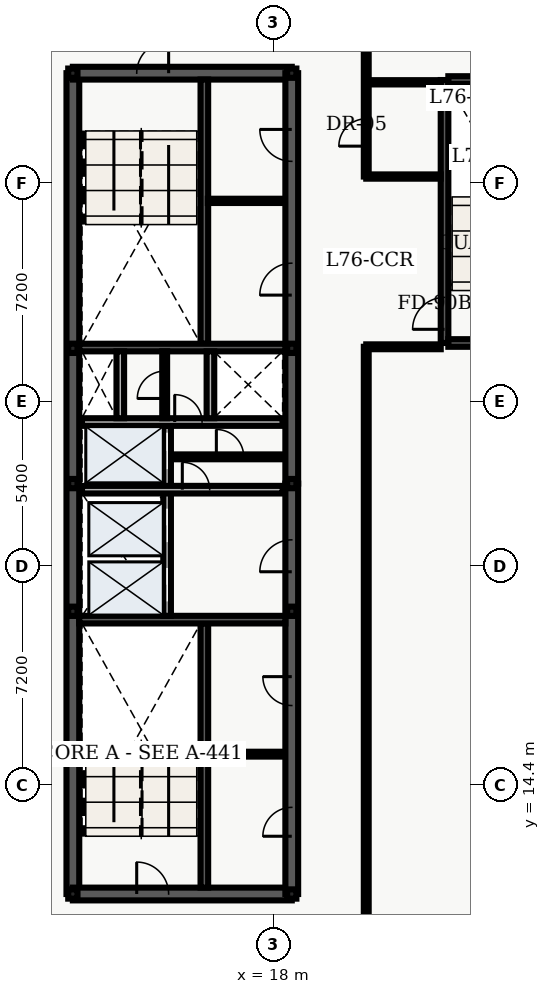
"""IFC4 building model, lengths in metres.
Left out: names, types, materials, properties, quantities, classifications, styles, units other than length and angle.
Written with IfcOpenShell. Run it as: python <this file> out.ifc"""

import sys

from ifc_helpers import new_model, entity, si_unit, converted_unit, direction, frame, origin_with_axes, origin_2d_with_axis, place, context, subcontext, project, spatial, polyline, rectangle, hollow_rectangle, outline, extrude, element, fill, save


model = new_model("IFC4")
c1 = context("Model", 3, precision=1e-05, world=origin_with_axes(), true_north=direction((0.0, 1.0)))
c2 = subcontext(c1, "Body", "Model", "MODEL_VIEW")
j1 = project(units=[si_unit("LENGTHUNIT", "METRE"), converted_unit("PLANEANGLEUNIT", "DEGREE", entity("IfcPlaneAngleMeasure", 0.017), si_unit("PLANEANGLEUNIT", "RADIAN"), dimensions=[0, 0, 0, 0, 0, 0, 0])], contexts=[c1])
p1 = place(None, origin_with_axes())
s1 = spatial("IfcSite", under=j1, at=p1, CompositionType="ELEMENT")
p2 = place(p1, origin_with_axes())
s2 = spatial("IfcBuilding", under=s1, at=p2, CompositionType="ELEMENT")
p3 = place(p2, frame((0.0, 0.0, 308.7), z_axis=(0.0, 0.0, 1.0), x_axis=(1.0, 0.0, 0.0)))
s3 = spatial("IfcBuildingStorey", under=s2, at=p3, CompositionType="ELEMENT", Elevation=308.7)
p4 = place(p3, frame((11.4, 10.8, 0.0), z_axis=(0.0, 0.0, 1.0), x_axis=(0.0, 1.0, 0.0)))
e1 = element("IfcWall", 1, at=p4, inside=s3, PredefinedType="SHEAR", context=c2, shape_type="SweptSolid", body=[
    extrude(outline(polyline([(0.0, -0.21), (27.0, -0.21), (27.0, 0.21), (0.0, 0.21), (0.0, -0.21)])), origin_with_axes(), (0.0, 0.0, 1.0), 3.64),
])
p5 = place(p3, frame((11.4, 10.8, 0.0), z_axis=(0.0, 0.0, 1.0), x_axis=(1.0, 0.0, 0.0)))
e2 = element("IfcWall", 2, at=p5, inside=s3, PredefinedType="SHEAR", context=c2, shape_type="SweptSolid", body=[
    extrude(outline(polyline([(0.0, -0.21), (7.2, -0.21), (7.2, 0.21), (0.0, 0.21), (0.0, -0.21)])), origin_with_axes(), (0.0, 0.0, 1.0), 3.64),
])
p6 = place(p5, frame((2.625, 0.0, 0.0), z_axis=(0.0, 0.0, 1.0), x_axis=(1.0, 0.0, 0.0)))
e3 = element("IfcOpeningElement", 3, at=p6, cuts=e2, PredefinedType="OPENING", context=c2, shape_type="SweptSolid", body=[
    extrude(rectangle(XDim=1.05, YDim=0.44, at=origin_2d_with_axis()), origin_with_axes(), (0.0, 0.0, 1.0), 2.15),
])
p7 = place(p3, frame((11.4, 37.8, 0.0), z_axis=(0.0, 0.0, 1.0), x_axis=(1.0, 0.0, 0.0)))
e4 = element("IfcWall", 4, at=p7, inside=s3, PredefinedType="SHEAR", context=c2, shape_type="SweptSolid", body=[
    extrude(outline(polyline([(0.0, -0.21), (7.2, -0.21), (7.2, 0.21), (0.0, 0.21), (0.0, -0.21)])), origin_with_axes(), (0.0, 0.0, 1.0), 3.64),
])
p8 = place(p7, frame((2.625, 0.0, 0.0), z_axis=(0.0, 0.0, 1.0), x_axis=(1.0, 0.0, 0.0)))
e5 = element("IfcOpeningElement", 5, at=p8, cuts=e4, PredefinedType="OPENING", context=c2, shape_type="SweptSolid", body=[
    extrude(rectangle(XDim=1.05, YDim=0.44, at=origin_2d_with_axis()), origin_with_axes(), (0.0, 0.0, 1.0), 2.15),
])
p9 = place(p3, frame((18.6, 10.8, 0.0), z_axis=(0.0, 0.0, 1.0), x_axis=(0.0, 1.0, 0.0)))
e6 = element("IfcWall", 6, at=p9, inside=s3, PredefinedType="SHEAR", context=c2, shape_type="SweptSolid", body=[
    extrude(outline(polyline([(0.0, -0.21), (13.5, -0.21), (13.5, 0.21), (0.0, 0.21), (0.0, -0.21)])), origin_with_axes(), (0.0, 0.0, 1.0), 3.64),
])
p10 = place(p9, frame((11.125, 0.0, 0.0), z_axis=(0.0, 0.0, 1.0), x_axis=(1.0, 0.0, 0.0)))
e7 = element("IfcOpeningElement", 7, at=p10, cuts=e6, PredefinedType="OPENING", context=c2, shape_type="SweptSolid", body=[
    extrude(rectangle(XDim=1.05, YDim=0.44, at=origin_2d_with_axis()), origin_with_axes(), (0.0, 0.0, 1.0), 2.15),
])
p11 = place(p9, frame((2.375, 0.0, 0.0), z_axis=(0.0, 0.0, 1.0), x_axis=(1.0, 0.0, 0.0)))
e8 = element("IfcOpeningElement", 8, at=p11, cuts=e6, PredefinedType="OPENING", context=c2, shape_type="SweptSolid", body=[
    extrude(rectangle(XDim=0.95, YDim=0.44, at=origin_2d_with_axis()), origin_with_axes(), (0.0, 0.0, 1.0), 2.15),
])
p12 = place(p9, frame((6.675, 0.0, 0.0), z_axis=(0.0, 0.0, 1.0), x_axis=(1.0, 0.0, 0.0)))
e9 = element("IfcOpeningElement", 9, at=p12, cuts=e6, PredefinedType="OPENING", context=c2, shape_type="SweptSolid", body=[
    extrude(rectangle(XDim=0.95, YDim=0.44, at=origin_2d_with_axis()), origin_with_axes(), (0.0, 0.0, 1.0), 2.15),
])
p13 = place(p3, frame((18.6, 24.3, 0.0), z_axis=(0.0, 0.0, 1.0), x_axis=(0.0, 1.0, 0.0)))
e10 = element("IfcWall", 10, at=p13, inside=s3, PredefinedType="SHEAR", context=c2, shape_type="SweptSolid", body=[
    extrude(outline(polyline([(0.0, -0.21), (13.5, -0.21), (13.5, 0.21), (0.0, 0.21), (0.0, -0.21)])), origin_with_axes(), (0.0, 0.0, 1.0), 3.64),
])
p14 = place(p13, frame((6.725, 0.0, 0.0), z_axis=(0.0, 0.0, 1.0), x_axis=(1.0, 0.0, 0.0)))
e11 = element("IfcOpeningElement", 11, at=p14, cuts=e10, PredefinedType="OPENING", context=c2, shape_type="SweptSolid", body=[
    extrude(rectangle(XDim=1.05, YDim=0.44, at=origin_2d_with_axis()), origin_with_axes(), (0.0, 0.0, 1.0), 2.15),
])
p15 = place(p13, frame((11.125, 0.0, 0.0), z_axis=(0.0, 0.0, 1.0), x_axis=(1.0, 0.0, 0.0)))
e12 = element("IfcOpeningElement", 12, at=p15, cuts=e10, PredefinedType="OPENING", context=c2, shape_type="SweptSolid", body=[
    extrude(rectangle(XDim=1.05, YDim=0.44, at=origin_2d_with_axis()), origin_with_axes(), (0.0, 0.0, 1.0), 2.15),
])
p16 = place(p3, frame((15.725, 11.01, 0.0), z_axis=(0.0, 0.0, 1.0), x_axis=(0.0, 1.0, 0.0)))
e13 = element("IfcWall", 13, at=p16, inside=s3, PredefinedType="SHEAR", context=c2, shape_type="SweptSolid", body=[
    extrude(outline(polyline([(0.0, -0.125), (8.69, -0.125), (8.69, 0.125), (0.0, 0.125), (0.0, -0.125)])), origin_with_axes(), (0.0, 0.0, 1.0), 3.64),
])
p17 = place(p3, frame((11.61, 19.825, 0.0), z_axis=(0.0, 0.0, 1.0), x_axis=(1.0, 0.0, 0.0)))
e14 = element("IfcWall", 14, at=p17, inside=s3, PredefinedType="SHEAR", context=c2, shape_type="SweptSolid", body=[
    extrude(outline(polyline([(0.0, -0.125), (6.78, -0.125), (6.78, 0.125), (0.0, 0.125), (0.0, -0.125)])), origin_with_axes(), (0.0, 0.0, 1.0), 3.64),
])
p18 = place(p3, frame((15.725, 28.9, 0.0), z_axis=(0.0, 0.0, 1.0), x_axis=(0.0, 1.0, 0.0)))
e15 = element("IfcWall", 15, at=p18, inside=s3, PredefinedType="SHEAR", context=c2, shape_type="SweptSolid", body=[
    extrude(outline(polyline([(0.0, -0.125), (8.69, -0.125), (8.69, 0.125), (0.0, 0.125), (0.0, -0.125)])), origin_with_axes(), (0.0, 0.0, 1.0), 3.64),
])
p19 = place(p3, frame((11.61, 28.775, 0.0), z_axis=(0.0, 0.0, 1.0), x_axis=(1.0, 0.0, 0.0)))
e16 = element("IfcWall", 16, at=p19, inside=s3, PredefinedType="SHEAR", context=c2, shape_type="SweptSolid", body=[
    extrude(outline(polyline([(0.0, -0.125), (6.78, -0.125), (6.78, 0.125), (0.0, 0.125), (0.0, -0.125)])), origin_with_axes(), (0.0, 0.0, 1.0), 3.64),
])
p20 = place(p3, frame((14.5, 19.95, 0.0), z_axis=(0.0, 0.0, 1.0), x_axis=(0.0, 1.0, 0.0)))
e17 = element("IfcWall", 17, at=p20, inside=s3, PredefinedType="SOLIDWALL", context=c2, shape_type="SweptSolid", body=[
    extrude(outline(polyline([(0.0, -0.125), (6.25, -0.125), (6.25, 0.125), (0.0, 0.125), (0.0, -0.125)])), origin_with_axes(), (0.0, 0.0, 1.0), 2.68),
])
p21 = place(p20, frame((1.025, 0.0, 0.0), z_axis=(0.0, 0.0, 1.0), x_axis=(1.0, 0.0, 0.0)))
e18 = element("IfcOpeningElement", 18, at=p21, cuts=e17, PredefinedType="OPENING", context=c2, shape_type="SweptSolid", body=[
    extrude(rectangle(XDim=1.1, YDim=0.27, at=origin_2d_with_axis()), origin_with_axes(), (0.0, 0.0, 1.0), 2.15),
])
p22 = place(p20, frame((2.975, 0.0, 0.0), z_axis=(0.0, 0.0, 1.0), x_axis=(1.0, 0.0, 0.0)))
e19 = element("IfcOpeningElement", 19, at=p22, cuts=e17, PredefinedType="OPENING", context=c2, shape_type="SweptSolid", body=[
    extrude(rectangle(XDim=1.1, YDim=0.27, at=origin_2d_with_axis()), origin_with_axes(), (0.0, 0.0, 1.0), 2.15),
])
p23 = place(p20, frame((5.425, 0.0, 0.0), z_axis=(0.0, 0.0, 1.0), x_axis=(1.0, 0.0, 0.0)))
e20 = element("IfcOpeningElement", 20, at=p23, cuts=e17, PredefinedType="OPENING", context=c2, shape_type="SweptSolid", body=[
    extrude(rectangle(XDim=1.2, YDim=0.27, at=origin_2d_with_axis()), origin_with_axes(), (0.0, 0.0, 1.0), 2.15),
])
p24 = place(p3, frame((11.7, 24.1, 0.0), z_axis=(0.0, 0.0, 1.0), x_axis=(1.0, 0.0, 0.0)))
e21 = element("IfcWall", 21, at=p24, inside=s3, PredefinedType="SOLIDWALL", context=c2, shape_type="SweptSolid", body=[
    extrude(outline(polyline([(0.0, -0.125), (6.6, -0.125), (6.6, 0.125), (0.0, 0.125), (0.0, -0.125)])), origin_with_axes(), (0.0, 0.0, 1.0), 2.68),
])
p25 = place(p24, frame((3.75, 0.0, 0.0), z_axis=(0.0, 0.0, 1.0), x_axis=(1.0, 0.0, 0.0)))
e22 = element("IfcOpeningElement", 22, at=p25, cuts=e21, PredefinedType="OPENING", context=c2, shape_type="SweptSolid", body=[
    extrude(rectangle(XDim=0.9, YDim=0.27, at=origin_2d_with_axis()), origin_with_axes(), (0.0, 0.0, 1.0), 2.15),
])
p26 = place(p3, frame((11.7, 26.325, 0.0), z_axis=(0.0, 0.0, 1.0), x_axis=(1.0, 0.0, 0.0)))
e23 = element("IfcWall", 23, at=p26, inside=s3, PredefinedType="SOLIDWALL", context=c2, shape_type="SweptSolid", body=[
    extrude(outline(polyline([(0.0, -0.125), (6.6, -0.125), (6.6, 0.125), (0.0, 0.125), (0.0, -0.125)])), origin_with_axes(), (0.0, 0.0, 1.0), 2.68),
])
p27 = place(p26, frame((3.5, 0.0, 0.0), z_axis=(0.0, 0.0, 1.0), x_axis=(1.0, 0.0, 0.0)))
e24 = element("IfcOpeningElement", 24, at=p27, cuts=e23, PredefinedType="OPENING", context=c2, shape_type="SweptSolid", body=[
    extrude(rectangle(XDim=0.9, YDim=0.27, at=origin_2d_with_axis()), origin_with_axes(), (0.0, 0.0, 1.0), 2.15),
])
for number, where, z_axis, x_axis in (
    (25, (12.96, 26.45, 0.0), (0.0, 0.0, 1.0), (0.0, 1.0, 0.0)),
    (26, (15.925, 26.45, 0.0), (0.0, 0.0, 1.0), (0.0, 1.0, 0.0)),
):
    element("IfcWall", number, at=place(p3, frame(where, z_axis=z_axis, x_axis=x_axis)), inside=s3, PredefinedType="SOLIDWALL", context=c2, shape_type="SweptSolid", body=[
        extrude(outline(polyline([(0.0, -0.125), (2.2, -0.125), (2.2, 0.125), (0.0, 0.125), (0.0, -0.125)])), origin_with_axes(), (0.0, 0.0, 1.0), 2.68),
    ])
p28 = place(p3, frame((23.625, 28.925, 0.0), z_axis=(0.0, 0.0, 1.0), x_axis=(0.0, 1.0, 0.0)))
e27 = element("IfcWall", 27, at=p28, inside=s3, PredefinedType="SHEAR", context=c2, shape_type="SweptSolid", body=[
    extrude(outline(polyline([(0.0, -0.125), (8.65, -0.125), (8.65, 0.125), (0.0, 0.125), (0.0, -0.125)])), origin_with_axes(), (0.0, 0.0, 1.0), 3.64),
])
p29 = place(p28, frame((0.975, 0.0, 0.0), z_axis=(0.0, 0.0, 1.0), x_axis=(1.0, 0.0, 0.0)))
e28 = element("IfcOpeningElement", 28, at=p29, cuts=e27, PredefinedType="OPENING", context=c2, shape_type="SweptSolid", body=[
    extrude(rectangle(XDim=1.05, YDim=0.27, at=origin_2d_with_axis()), origin_with_axes(), (0.0, 0.0, 1.0), 2.15),
])
for number, where, z_axis, x_axis in (
    (29, (23.75, 28.925, 0.0), (0.0, 0.0, 1.0), (1.0, 0.0, 0.0)),
    (30, (23.75, 37.575, 0.0), (0.0, 0.0, 1.0), (1.0, 0.0, 0.0)),
):
    element("IfcWall", number, at=place(p3, frame(where, z_axis=z_axis, x_axis=x_axis)), inside=s3, PredefinedType="SHEAR", context=c2, shape_type="SweptSolid", body=[
        extrude(outline(polyline([(0.0, -0.125), (3.9, -0.125), (3.9, 0.125), (0.0, 0.125), (0.0, -0.125)])), origin_with_axes(), (0.0, 0.0, 1.0), 3.64),
    ])
for number, where, z_axis, x_axis in (
    (31, (11.4, 10.8, 0.0), (0.0, 0.0, 1.0), (1.0, 0.0, 0.0)),
    (32, (11.4, 20.1, 0.0), (0.0, 0.0, 1.0), (1.0, 0.0, 0.0)),
    (33, (11.4, 24.3, 0.0), (0.0, 0.0, 1.0), (1.0, 0.0, 0.0)),
    (34, (11.4, 28.75, 0.0), (0.0, 0.0, 1.0), (1.0, 0.0, 0.0)),
    (35, (11.4, 37.8, 0.0), (0.0, 0.0, 1.0), (1.0, 0.0, 0.0)),
    (36, (18.6, 10.8, 0.0), (0.0, 0.0, 1.0), (1.0, 0.0, 0.0)),
    (37, (18.6, 20.1, 0.0), (0.0, 0.0, 1.0), (1.0, 0.0, 0.0)),
    (38, (18.6, 24.3, 0.0), (0.0, 0.0, 1.0), (1.0, 0.0, 0.0)),
    (39, (18.6, 28.75, 0.0), (0.0, 0.0, 1.0), (1.0, 0.0, 0.0)),
    (40, (18.6, 37.8, 0.0), (0.0, 0.0, 1.0), (1.0, 0.0, 0.0)),
):
    element("IfcColumn", number, at=place(p3, frame(where, z_axis=z_axis, x_axis=x_axis)), inside=s3, PredefinedType="COLUMN", context=c2, shape_type="SweptSolid", body=[
        extrude(hollow_rectangle(XDim=0.305, YDim=0.305, WallThickness=0.015, InnerFilletRadius=0.015, OuterFilletRadius=0.03, at=origin_2d_with_axis()), origin_with_axes(), (0.0, 0.0, 1.0), 3.9),
    ])
p30 = place(p3, frame((14.62, 25.18, 0.0), z_axis=(0.0, 0.0, 1.0), x_axis=(1.0, 0.0, 0.0)))
e41 = element("IfcWall", 41, at=p30, inside=s3, PredefinedType="PARTITIONING", context=c2, shape_type="SweptSolid", body=[
    extrude(outline(polyline([(0.0, -0.08), (3.68, -0.08), (3.68, 0.08), (0.0, 0.08), (0.0, -0.08)])), origin_with_axes(), (0.0, 0.0, 1.0), 2.68),
])
p31 = place(p30, frame((1.95, 0.0, 0.0), z_axis=(0.0, 0.0, 1.0), x_axis=(1.0, 0.0, 0.0)))
e42 = element("IfcOpeningElement", 42, at=p31, cuts=e41, PredefinedType="OPENING", context=c2, shape_type="SweptSolid", body=[
    extrude(rectangle(XDim=0.9, YDim=0.18, at=origin_2d_with_axis()), origin_with_axes(), (0.0, 0.0, 1.0), 2.15),
])
p32 = place(p3, frame((14.42, 26.45, 0.0), z_axis=(0.0, 0.0, 1.0), x_axis=(0.0, 1.0, 0.0)))
e43 = element("IfcWall", 43, at=p32, inside=s3, PredefinedType="PARTITIONING", context=c2, shape_type="SweptSolid", body=[
    extrude(outline(polyline([(0.0, -0.08), (2.2, -0.08), (2.2, 0.08), (0.0, 0.08), (0.0, -0.08)])), origin_with_axes(), (0.0, 0.0, 1.0), 2.68),
])
p33 = place(p32, frame((1.1, 0.0, 0.0), z_axis=(0.0, 0.0, 1.0), x_axis=(1.0, 0.0, 0.0)))
e44 = element("IfcOpeningElement", 44, at=p33, cuts=e43, PredefinedType="OPENING", context=c2, shape_type="SweptSolid", body=[
    extrude(rectangle(XDim=0.9, YDim=0.18, at=origin_2d_with_axis()), origin_with_axes(), (0.0, 0.0, 1.0), 2.15),
])
p34 = place(p3, frame((15.84, 15.4, 0.0), z_axis=(0.0, 0.0, 1.0), x_axis=(1.0, 0.0, 0.0)))
e45 = element("IfcWall", 45, at=p34, inside=s3, PredefinedType="PARTITIONING", context=c2, shape_type="SweptSolid", body=[
    extrude(outline(polyline([(0.0, -0.08), (2.46, -0.08), (2.46, 0.08), (0.0, 0.08), (0.0, -0.08)])), origin_with_axes(), (0.0, 0.0, 1.0), 2.68),
])
p35 = place(p3, frame((15.84, 33.6, 0.0), z_axis=(0.0, 0.0, 1.0), x_axis=(1.0, 0.0, 0.0)))
e46 = element("IfcWall", 46, at=p35, inside=s3, PredefinedType="PARTITIONING", context=c2, shape_type="SweptSolid", body=[
    extrude(outline(polyline([(0.0, -0.07), (2.46, -0.07), (2.46, 0.07), (0.0, 0.07), (0.0, -0.07)])), origin_with_axes(), (0.0, 0.0, 1.0), 2.68),
])
for number, where, z_axis, x_axis in (
    (47, (21.05, 34.4, 0.0), (0.0, 0.0, 1.0), (1.0, 0.0, 0.0)),
    (48, (21.05, 37.5, 0.0), (0.0, 0.0, 1.0), (1.0, 0.0, 0.0)),
):
    element("IfcWall", number, at=place(p3, frame(where, z_axis=z_axis, x_axis=x_axis)), inside=s3, PredefinedType="PARTITIONING", context=c2, shape_type="SweptSolid", body=[
        extrude(outline(polyline([(0.0, -0.07), (2.45, -0.07), (2.45, 0.07), (0.0, 0.07), (0.0, -0.07)])), origin_with_axes(), (0.0, 0.0, 1.0), 2.68),
    ])
p36 = place(p3, frame((21.05, 3.895, 0.0), z_axis=(0.0, 0.0, 1.0), x_axis=(0.0, 1.0, 0.0)))
e49 = element("IfcWall", 49, at=p36, inside=s3, PredefinedType="PARTITIONING", context=c2, shape_type="SweptSolid", body=[
    extrude(outline(polyline([(0.0, -0.08), (24.905, -0.08), (24.905, 0.08), (0.0, 0.08), (0.0, -0.08)])), origin_with_axes(), (0.0, 0.0, 1.0), 2.68),
])
p37 = place(p36, frame((4.78, 0.0, 0.0), z_axis=(0.0, 0.0, 1.0), x_axis=(1.0, 0.0, 0.0)))
e50 = element("IfcOpeningElement", 50, at=p37, cuts=e49, PredefinedType="OPENING", context=c2, shape_type="SweptSolid", body=[
    extrude(rectangle(XDim=1.05, YDim=0.18, at=origin_2d_with_axis()), origin_with_axes(), (0.0, 0.0, 1.0), 2.15),
])
p38 = place(p3, frame((21.05, 34.4, 0.0), z_axis=(0.0, 0.0, 1.0), x_axis=(0.0, 1.0, 0.0)))
e51 = element("IfcWall", 51, at=p38, inside=s3, PredefinedType="PARTITIONING", context=c2, shape_type="SweptSolid", body=[
    extrude(outline(polyline([(0.0, -0.08), (5.2, -0.08), (5.2, 0.08), (0.0, 0.08), (0.0, -0.08)])), origin_with_axes(), (0.0, 0.0, 1.0), 2.68),
])
p39 = place(p38, frame((1.45, 0.0, 0.0), z_axis=(0.0, 0.0, 1.0), x_axis=(1.0, 0.0, 0.0)))
e52 = element("IfcOpeningElement", 52, at=p39, cuts=e51, PredefinedType="OPENING", context=c2, shape_type="SweptSolid", body=[
    extrude(rectangle(XDim=0.9, YDim=0.18, at=origin_2d_with_axis()), origin_with_axes(), (0.0, 0.0, 1.0), 2.15),
])
p40 = place(p3, frame((21.05, 28.8, 0.0), z_axis=(0.0, 0.0, 1.0), x_axis=(1.0, 0.0, 0.0)))
e53 = element("IfcWall", 53, at=p40, inside=s3, PredefinedType="PARTITIONING", context=c2, shape_type="SweptSolid", body=[
    extrude(outline(polyline([(0.0, -0.08), (2.45, -0.08), (2.45, 0.08), (0.0, 0.08), (0.0, -0.08)])), origin_with_axes(), (0.0, 0.0, 1.0), 2.68),
])
p41 = place(p20, frame((1.025, 0.0, 0.0), z_axis=(0.0, 0.0, 1.0), x_axis=(1.0, 0.0, 0.0)))
e54 = element("IfcDoor", 54, at=p41, inside=s3, OperationType="SLIDING_TO_LEFT", PredefinedType="DOOR", context=c2, shape_type="SweptSolid", body=[
    extrude(rectangle(XDim=1.1, YDim=0.09, at=origin_2d_with_axis()), origin_with_axes(), (0.0, 0.0, 1.0), 2.15),
])
fill(e18, e54)
p42 = place(p20, frame((2.975, 0.0, 0.0), z_axis=(0.0, 0.0, 1.0), x_axis=(1.0, 0.0, 0.0)))
e55 = element("IfcDoor", 55, at=p42, inside=s3, OperationType="SLIDING_TO_RIGHT", PredefinedType="DOOR", context=c2, shape_type="SweptSolid", body=[
    extrude(rectangle(XDim=1.1, YDim=0.09, at=origin_2d_with_axis()), origin_with_axes(), (0.0, 0.0, 1.0), 2.15),
])
fill(e19, e55)
p43 = place(p20, frame((5.425, 0.0, 0.0), z_axis=(0.0, 0.0, 1.0), x_axis=(1.0, 0.0, 0.0)))
e56 = element("IfcDoor", 56, at=p43, inside=s3, OperationType="DOUBLE_DOOR_SLIDING", PredefinedType="DOOR", context=c2, shape_type="SweptSolid", body=[
    extrude(rectangle(XDim=1.2, YDim=0.09, at=origin_2d_with_axis()), origin_with_axes(), (0.0, 0.0, 1.0), 2.15),
])
fill(e20, e56)
p44 = place(p5, frame((2.625, 0.0, 0.0), z_axis=(0.0, 0.0, 1.0), x_axis=(1.0, 0.0, 0.0)))
e57 = element("IfcDoor", 57, at=p44, inside=s3, OperationType="SINGLE_SWING_LEFT", PredefinedType="DOOR", context=c2, shape_type="SweptSolid", body=[
    extrude(rectangle(XDim=1.05, YDim=0.09, at=origin_2d_with_axis()), origin_with_axes(), (0.0, 0.0, 1.0), 2.15),
])
fill(e3, e57)
p45 = place(p7, frame((2.625, 0.0, 0.0), z_axis=(0.0, 0.0, 1.0), x_axis=(1.0, 0.0, 0.0)))
e58 = element("IfcDoor", 58, at=p45, inside=s3, OperationType="SINGLE_SWING_RIGHT", PredefinedType="DOOR", context=c2, shape_type="SweptSolid", body=[
    extrude(rectangle(XDim=1.05, YDim=0.09, at=origin_2d_with_axis()), origin_with_axes(), (0.0, 0.0, 1.0), 2.15),
])
fill(e5, e58)
p46 = place(p9, frame((11.125, 0.0, 0.0), z_axis=(0.0, 0.0, 1.0), x_axis=(1.0, 0.0, 0.0)))
e59 = element("IfcDoor", 59, at=p46, inside=s3, OperationType="SINGLE_SWING_LEFT", PredefinedType="DOOR", context=c2, shape_type="SweptSolid", body=[
    extrude(rectangle(XDim=1.05, YDim=0.09, at=origin_2d_with_axis()), origin_with_axes(), (0.0, 0.0, 1.0), 2.15),
])
fill(e7, e59)
p47 = place(p26, frame((3.5, 0.0, 0.0), z_axis=(0.0, 0.0, 1.0), x_axis=(1.0, 0.0, 0.0)))
e60 = element("IfcDoor", 60, at=p47, inside=s3, OperationType="SINGLE_SWING_LEFT", PredefinedType="DOOR", context=c2, shape_type="SweptSolid", body=[
    extrude(rectangle(XDim=0.9, YDim=0.09, at=origin_2d_with_axis()), origin_with_axes(), (0.0, 0.0, 1.0), 2.15),
])
fill(e24, e60)
p48 = place(p32, frame((1.1, 0.0, 0.0), z_axis=(0.0, 0.0, 1.0), x_axis=(1.0, 0.0, 0.0)))
e61 = element("IfcDoor", 61, at=p48, inside=s3, OperationType="SINGLE_SWING_LEFT", PredefinedType="DOOR", context=c2, shape_type="SweptSolid", body=[
    extrude(rectangle(XDim=0.9, YDim=0.09, at=origin_2d_with_axis()), origin_with_axes(), (0.0, 0.0, 1.0), 2.15),
])
fill(e44, e61)
p49 = place(p24, frame((3.75, 0.0, 0.0), z_axis=(0.0, 0.0, 1.0), x_axis=(1.0, 0.0, 0.0)))
e62 = element("IfcDoor", 62, at=p49, inside=s3, OperationType="SINGLE_SWING_LEFT", PredefinedType="DOOR", context=c2, shape_type="SweptSolid", body=[
    extrude(rectangle(XDim=0.9, YDim=0.09, at=origin_2d_with_axis()), origin_with_axes(), (0.0, 0.0, 1.0), 2.15),
])
fill(e22, e62)
p50 = place(p30, frame((1.95, 0.0, 0.0), z_axis=(0.0, 0.0, 1.0), x_axis=(1.0, 0.0, 0.0)))
e63 = element("IfcDoor", 63, at=p50, inside=s3, OperationType="SINGLE_SWING_LEFT", PredefinedType="DOOR", context=c2, shape_type="SweptSolid", body=[
    extrude(rectangle(XDim=0.9, YDim=0.09, at=origin_2d_with_axis()), origin_with_axes(), (0.0, 0.0, 1.0), 2.15),
])
fill(e42, e63)
p51 = place(p9, frame((2.375, 0.0, 0.0), z_axis=(0.0, 0.0, 1.0), x_axis=(1.0, 0.0, 0.0)))
e64 = element("IfcDoor", 64, at=p51, inside=s3, OperationType="SINGLE_SWING_LEFT", PredefinedType="DOOR", context=c2, shape_type="SweptSolid", body=[
    extrude(rectangle(XDim=0.95, YDim=0.09, at=origin_2d_with_axis()), origin_with_axes(), (0.0, 0.0, 1.0), 2.15),
])
fill(e8, e64)
p52 = place(p9, frame((6.675, 0.0, 0.0), z_axis=(0.0, 0.0, 1.0), x_axis=(1.0, 0.0, 0.0)))
e65 = element("IfcDoor", 65, at=p52, inside=s3, OperationType="SINGLE_SWING_RIGHT", PredefinedType="DOOR", context=c2, shape_type="SweptSolid", body=[
    extrude(rectangle(XDim=0.95, YDim=0.09, at=origin_2d_with_axis()), origin_with_axes(), (0.0, 0.0, 1.0), 2.15),
])
fill(e9, e65)
p53 = place(p13, frame((6.725, 0.0, 0.0), z_axis=(0.0, 0.0, 1.0), x_axis=(1.0, 0.0, 0.0)))
e66 = element("IfcDoor", 66, at=p53, inside=s3, OperationType="SINGLE_SWING_LEFT", PredefinedType="DOOR", context=c2, shape_type="SweptSolid", body=[
    extrude(rectangle(XDim=1.05, YDim=0.09, at=origin_2d_with_axis()), origin_with_axes(), (0.0, 0.0, 1.0), 2.15),
])
fill(e11, e66)
p54 = place(p13, frame((11.125, 0.0, 0.0), z_axis=(0.0, 0.0, 1.0), x_axis=(1.0, 0.0, 0.0)))
e67 = element("IfcDoor", 67, at=p54, inside=s3, OperationType="SINGLE_SWING_RIGHT", PredefinedType="DOOR", context=c2, shape_type="SweptSolid", body=[
    extrude(rectangle(XDim=1.05, YDim=0.09, at=origin_2d_with_axis()), origin_with_axes(), (0.0, 0.0, 1.0), 2.15),
])
fill(e12, e67)
p55 = place(p28, frame((0.975, 0.0, 0.0), z_axis=(0.0, 0.0, 1.0), x_axis=(1.0, 0.0, 0.0)))
e68 = element("IfcDoor", 68, at=p55, inside=s3, OperationType="SINGLE_SWING_LEFT", PredefinedType="DOOR", context=c2, shape_type="SweptSolid", body=[
    extrude(rectangle(XDim=1.05, YDim=0.09, at=origin_2d_with_axis()), origin_with_axes(), (0.0, 0.0, 1.0), 2.15),
])
fill(e28, e68)
p56 = place(p38, frame((1.45, 0.0, 0.0), z_axis=(0.0, 0.0, 1.0), x_axis=(1.0, 0.0, 0.0)))
e69 = element("IfcDoor", 69, at=p56, inside=s3, OperationType="SINGLE_SWING_LEFT", PredefinedType="DOOR", context=c2, shape_type="SweptSolid", body=[
    extrude(rectangle(XDim=0.9, YDim=0.09, at=origin_2d_with_axis()), origin_with_axes(), (0.0, 0.0, 1.0), 2.15),
])
fill(e52, e69)
save(model, sys.argv[1])
